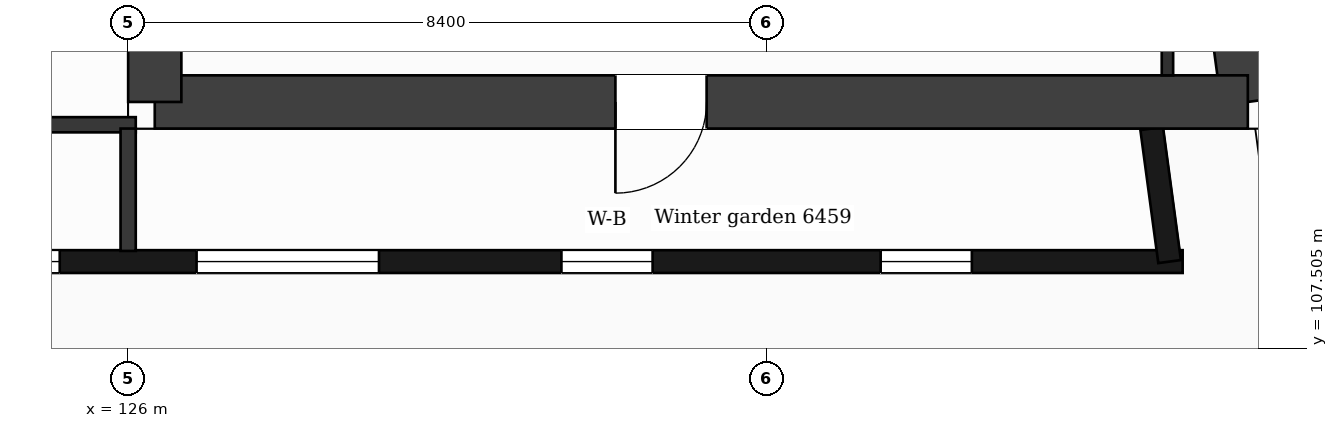
"""IFC4 building model, lengths in metres.
Left out: names, types, materials, properties, quantities, classifications, styles, units other than length and angle.
Written with IfcOpenShell. Run it as: python <this file> out.ifc"""

import sys

from ifc_helpers import new_model, si_unit, direction, frame, frame_2d, origin, place, context, subcontext, project, spatial, rectangle, extrude, element, fill, save


model = new_model("IFC4")
c1 = context("Model", 3, precision=1e-05, world=origin(), true_north=direction((0.0, 1.0)))
c2 = subcontext(c1, "Body", "Model", "MODEL_VIEW")
j1 = project(units=[si_unit("LENGTHUNIT", "METRE"), si_unit("PLANEANGLEUNIT", "RADIAN")], contexts=[c1])
p1 = place(None, origin())
s1 = spatial("IfcSite", under=j1, at=p1, CompositionType="ELEMENT")
p2 = place(p1, origin())
s2 = spatial("IfcBuilding", under=s1, at=p2, CompositionType="ELEMENT")
p3 = place(p2, frame((0.0, 0.0, 266.4)))
s3 = spatial("IfcBuildingStorey", under=s2, at=p3, CompositionType="ELEMENT", Elevation=266.4)
p4 = place(p3, frame((137.863, 132.05, 0.0), z_axis=(0.0, 0.0, 1.0), x_axis=(0.133406218907, -0.991061441464, 0.0)))
e1 = element("IfcWall", 1, at=p4, inside=s3, PredefinedType="SHEAR", context=c2, shape_type="SweptSolid", body=[
    extrude(rectangle(XDim=21.492, YDim=0.7, at=frame_2d((10.746, 0.0))), origin(), (0.0, 0.0, 1.0), 3.7),
])
p5 = place(p3, frame((140.73, 110.75, 0.0), z_axis=(0.0, 0.0, 1.0), x_axis=(-1.0, 0.0, 0.0)))
e2 = element("IfcWall", 2, at=p5, inside=s3, PredefinedType="SHEAR", context=c2, shape_type="SweptSolid", body=[
    extrude(rectangle(XDim=14.38, YDim=0.7, at=frame_2d((7.19, 0.0))), origin(), (0.0, 0.0, 1.0), 3.7),
])
p6 = place(p5, frame((7.12, 0.0, 0.0)))
e3 = element("IfcOpeningElement", 3, at=p6, cuts=e2, PredefinedType="OPENING", context=c2, shape_type="SweptSolid", body=[
    extrude(rectangle(XDim=1.2, YDim=2.1, at=frame_2d((0.6, 1.05))), frame((0.0, 0.36, 0.0), z_axis=(0.0, -1.0, 0.0), x_axis=(1.0, 0.0, 0.0)), (0.0, 0.0, 1.0), 0.72),
])
p7 = place(p3, frame((126.35, 110.75, 0.0), z_axis=(0.0, 0.0, 1.0), x_axis=(0.0, 1.0, 0.0)))
e4 = element("IfcWall", 4, at=p7, inside=s3, PredefinedType="SHEAR", context=c2, shape_type="SweptSolid", body=[
    extrude(rectangle(XDim=21.3, YDim=0.7, at=frame_2d((10.65, 0.0))), origin(), (0.0, 0.0, 1.0), 3.7),
])
p8 = place(p7, frame((12.0, 0.0, 0.0)))
e5 = element("IfcOpeningElement", 5, at=p8, cuts=e4, PredefinedType="OPENING", context=c2, shape_type="SweptSolid", body=[
    extrude(rectangle(XDim=1.4, YDim=2.1, at=frame_2d((0.7, 1.05))), frame((0.0, 0.36, 0.0), z_axis=(0.0, -1.0, 0.0), x_axis=(1.0, 0.0, 0.0)), (0.0, 0.0, 1.0), 0.72),
])
p9 = place(p3, frame((87.099, 108.65, 0.0), z_axis=(0.0, 0.0, 1.0), x_axis=(1.0, 0.0, 0.0)))
e6 = element("IfcWall", 6, at=p9, inside=s3, PredefinedType="SOLIDWALL", context=c2, shape_type="SweptSolid", body=[
    extrude(rectangle(XDim=52.774, YDim=0.3, at=frame_2d((26.387, 0.0))), origin(), (0.0, 0.0, 1.0), 3.38),
])
p10 = place(p9, frame((2.001, 0.0, 0.9)))
e7 = element("IfcOpeningElement", 7, at=p10, cuts=e6, PredefinedType="OPENING", context=c2, shape_type="SweptSolid", body=[
    extrude(rectangle(XDim=2.4, YDim=2.1, at=frame_2d((1.2, 1.05))), frame((0.0, 0.16, 0.0), z_axis=(0.0, -1.0, 0.0), x_axis=(1.0, 0.0, 0.0)), (0.0, 0.0, 1.0), 0.32),
])
p11 = place(p9, frame((6.201, 0.0, 0.9)))
e8 = element("IfcOpeningElement", 8, at=p11, cuts=e6, PredefinedType="OPENING", context=c2, shape_type="SweptSolid", body=[
    extrude(rectangle(XDim=2.4, YDim=2.1, at=frame_2d((1.2, 1.05))), frame((0.0, 0.16, 0.0), z_axis=(0.0, -1.0, 0.0), x_axis=(1.0, 0.0, 0.0)), (0.0, 0.0, 1.0), 0.32),
])
p12 = place(p9, frame((10.401, 0.0, 0.9)))
e9 = element("IfcOpeningElement", 9, at=p12, cuts=e6, PredefinedType="OPENING", context=c2, shape_type="SweptSolid", body=[
    extrude(rectangle(XDim=2.4, YDim=2.1, at=frame_2d((1.2, 1.05))), frame((0.0, 0.16, 0.0), z_axis=(0.0, -1.0, 0.0), x_axis=(1.0, 0.0, 0.0)), (0.0, 0.0, 1.0), 0.32),
])
p13 = place(p9, frame((15.201, 0.0, 0.9)))
e10 = element("IfcOpeningElement", 10, at=p13, cuts=e6, PredefinedType="OPENING", context=c2, shape_type="SweptSolid", body=[
    extrude(rectangle(XDim=1.2, YDim=2.1, at=frame_2d((0.6, 1.05))), frame((0.0, 0.16, 0.0), z_axis=(0.0, -1.0, 0.0), x_axis=(1.0, 0.0, 0.0)), (0.0, 0.0, 1.0), 0.32),
])
p14 = place(p9, frame((19.401, 0.0, 0.9)))
e11 = element("IfcOpeningElement", 11, at=p14, cuts=e6, PredefinedType="OPENING", context=c2, shape_type="SweptSolid", body=[
    extrude(rectangle(XDim=1.2, YDim=2.1, at=frame_2d((0.6, 1.05))), frame((0.0, 0.16, 0.0), z_axis=(0.0, -1.0, 0.0), x_axis=(1.0, 0.0, 0.0)), (0.0, 0.0, 1.0), 0.32),
])
p15 = place(p9, frame((22.701, 0.0, 0.0)))
e12 = element("IfcOpeningElement", 12, at=p15, cuts=e6, PredefinedType="OPENING", context=c2, shape_type="SweptSolid", body=[
    extrude(rectangle(XDim=1.2, YDim=2.4, at=frame_2d((0.6, 1.2))), frame((0.0, 0.16, 0.0), z_axis=(0.0, -1.0, 0.0), x_axis=(1.0, 0.0, 0.0)), (0.0, 0.0, 1.0), 0.32),
])
p16 = place(p9, frame((24.501, 0.0, 0.9)))
e13 = element("IfcOpeningElement", 13, at=p16, cuts=e6, PredefinedType="OPENING", context=c2, shape_type="SweptSolid", body=[
    extrude(rectangle(XDim=1.2, YDim=2.1, at=frame_2d((0.6, 1.05))), frame((0.0, 0.16, 0.0), z_axis=(0.0, -1.0, 0.0), x_axis=(1.0, 0.0, 0.0)), (0.0, 0.0, 1.0), 0.32),
])
p17 = place(p9, frame((27.201, 0.0, 0.9)))
e14 = element("IfcOpeningElement", 14, at=p17, cuts=e6, PredefinedType="OPENING", context=c2, shape_type="SweptSolid", body=[
    extrude(rectangle(XDim=2.4, YDim=2.1, at=frame_2d((1.2, 1.05))), frame((0.0, 0.16, 0.0), z_axis=(0.0, -1.0, 0.0), x_axis=(1.0, 0.0, 0.0)), (0.0, 0.0, 1.0), 0.32),
])
p18 = place(p9, frame((31.102, 0.0, 0.0)))
e15 = element("IfcOpeningElement", 15, at=p18, cuts=e6, PredefinedType="OPENING", context=c2, shape_type="SweptSolid", body=[
    extrude(rectangle(XDim=1.2, YDim=2.4, at=frame_2d((0.6, 1.2))), frame((0.0, 0.16, 0.0), z_axis=(0.0, -1.0, 0.0), x_axis=(1.0, 0.0, 0.0)), (0.0, 0.0, 1.0), 0.32),
])
p19 = place(p9, frame((32.901, 0.0, 0.9)))
e16 = element("IfcOpeningElement", 16, at=p19, cuts=e6, PredefinedType="OPENING", context=c2, shape_type="SweptSolid", body=[
    extrude(rectangle(XDim=1.2, YDim=2.1, at=frame_2d((0.6, 1.05))), frame((0.0, 0.16, 0.0), z_axis=(0.0, -1.0, 0.0), x_axis=(1.0, 0.0, 0.0)), (0.0, 0.0, 1.0), 0.32),
])
p20 = place(p9, frame((35.602, 0.0, 0.9)))
e17 = element("IfcOpeningElement", 17, at=p20, cuts=e6, PredefinedType="OPENING", context=c2, shape_type="SweptSolid", body=[
    extrude(rectangle(XDim=2.4, YDim=2.1, at=frame_2d((1.2, 1.05))), frame((0.0, 0.16, 0.0), z_axis=(0.0, -1.0, 0.0), x_axis=(1.0, 0.0, 0.0)), (0.0, 0.0, 1.0), 0.32),
])
p21 = place(p9, frame((39.802, 0.0, 0.9)))
e18 = element("IfcOpeningElement", 18, at=p21, cuts=e6, PredefinedType="OPENING", context=c2, shape_type="SweptSolid", body=[
    extrude(rectangle(XDim=2.4, YDim=2.1, at=frame_2d((1.2, 1.05))), frame((0.0, 0.16, 0.0), z_axis=(0.0, -1.0, 0.0), x_axis=(1.0, 0.0, 0.0)), (0.0, 0.0, 1.0), 0.32),
])
p22 = place(p9, frame((44.602, 0.0, 0.9)))
e19 = element("IfcOpeningElement", 19, at=p22, cuts=e6, PredefinedType="OPENING", context=c2, shape_type="SweptSolid", body=[
    extrude(rectangle(XDim=1.2, YDim=2.1, at=frame_2d((0.6, 1.05))), frame((0.0, 0.16, 0.0), z_axis=(0.0, -1.0, 0.0), x_axis=(1.0, 0.0, 0.0)), (0.0, 0.0, 1.0), 0.32),
])
p23 = place(p9, frame((48.802, 0.0, 0.9)))
e20 = element("IfcOpeningElement", 20, at=p23, cuts=e6, PredefinedType="OPENING", context=c2, shape_type="SweptSolid", body=[
    extrude(rectangle(XDim=1.2, YDim=2.1, at=frame_2d((0.6, 1.05))), frame((0.0, 0.16, 0.0), z_axis=(0.0, -1.0, 0.0), x_axis=(1.0, 0.0, 0.0)), (0.0, 0.0, 1.0), 0.32),
])
p24 = place(p3, frame((139.701, 108.65, 0.0), z_axis=(0.0, 0.0, 1.0), x_axis=(-0.133422458344, 0.991059255347, 0.0)))
e21 = element("IfcWall", 21, at=p24, inside=s3, PredefinedType="SOLIDWALL", context=c2, shape_type="SweptSolid", body=[
    extrude(rectangle(XDim=1.766, YDim=0.3, at=frame_2d((0.883, 0.0))), origin(), (0.0, 0.0, 1.0), 3.38),
])
p25 = place(p3, frame((100.7, 110.45, 0.0), z_axis=(0.0, 0.0, 1.0), x_axis=(1.0, 0.0, 0.0)))
e22 = element("IfcWall", 22, at=p25, inside=s3, PredefinedType="PARTITIONING", context=c2, shape_type="SweptSolid", body=[
    extrude(rectangle(XDim=25.4, YDim=0.2, at=frame_2d((12.7, 0.0))), origin(), (0.0, 0.0, 1.0), 3.38),
])
p26 = place(p3, frame((126.0, 108.79, 0.0), z_axis=(0.0, 0.0, 1.0), x_axis=(0.0, 1.0, 0.0)))
e23 = element("IfcWall", 23, at=p26, inside=s3, PredefinedType="PARTITIONING", context=c2, shape_type="SweptSolid", body=[
    extrude(rectangle(XDim=1.61, YDim=0.2, at=frame_2d((0.805, 0.0))), origin(), (0.0, 0.0, 1.0), 3.38),
])
p27 = place(p3, frame((139.673, 111.1, 0.0), z_axis=(0.0, 0.0, 1.0), x_axis=(0.0, 1.0, 0.0)))
e24 = element("IfcWall", 24, at=p27, inside=s3, PredefinedType="PARTITIONING", context=c2, shape_type="SweptSolid", body=[
    extrude(rectangle(XDim=1.8, YDim=0.15, at=frame_2d((0.9, 0.0))), origin(), (0.0, 0.0, 1.0), 3.38),
])
p28 = place(p20, origin())
e25 = element("IfcWindow", 25, at=p28, inside=s3, PartitioningType="SINGLE_PANEL", PredefinedType="WINDOW", context=c2, shape_type="SweptSolid", body=[
    extrude(rectangle(XDim=2.4, YDim=2.1, at=frame_2d((1.2, 1.05))), frame((0.0, 0.03, 0.0), z_axis=(0.0, -1.0, 0.0), x_axis=(1.0, 0.0, 0.0)), (0.0, 0.0, 1.0), 0.06),
])
fill(e17, e25)
p29 = place(p21, origin())
e26 = element("IfcWindow", 26, at=p29, inside=s3, PartitioningType="SINGLE_PANEL", PredefinedType="WINDOW", context=c2, shape_type="SweptSolid", body=[
    extrude(rectangle(XDim=2.4, YDim=2.1, at=frame_2d((1.2, 1.05))), frame((0.0, 0.03, 0.0), z_axis=(0.0, -1.0, 0.0), x_axis=(1.0, 0.0, 0.0)), (0.0, 0.0, 1.0), 0.06),
])
fill(e18, e26)
p30 = place(p22, origin())
e27 = element("IfcWindow", 27, at=p30, inside=s3, PartitioningType="SINGLE_PANEL", PredefinedType="WINDOW", context=c2, shape_type="SweptSolid", body=[
    extrude(rectangle(XDim=1.2, YDim=2.1, at=frame_2d((0.6, 1.05))), frame((0.0, 0.03, 0.0), z_axis=(0.0, -1.0, 0.0), x_axis=(1.0, 0.0, 0.0)), (0.0, 0.0, 1.0), 0.06),
])
fill(e19, e27)
p31 = place(p23, origin())
e28 = element("IfcWindow", 28, at=p31, inside=s3, PartitioningType="SINGLE_PANEL", PredefinedType="WINDOW", context=c2, shape_type="SweptSolid", body=[
    extrude(rectangle(XDim=1.2, YDim=2.1, at=frame_2d((0.6, 1.05))), frame((0.0, 0.03, 0.0), z_axis=(0.0, -1.0, 0.0), x_axis=(1.0, 0.0, 0.0)), (0.0, 0.0, 1.0), 0.06),
])
fill(e20, e28)
p32 = place(p6, origin())
e29 = element("IfcDoor", 29, at=p32, inside=s3, OperationType="SINGLE_SWING_RIGHT", PredefinedType="DOOR", context=c2, shape_type="SweptSolid", body=[
    extrude(rectangle(XDim=1.2, YDim=2.1, at=frame_2d((0.6, 1.05))), frame((0.0, 0.025, 0.0), z_axis=(0.0, -1.0, 0.0), x_axis=(1.0, 0.0, 0.0)), (0.0, 0.0, 1.0), 0.05),
])
fill(e3, e29)
save(model, sys.argv[1])
